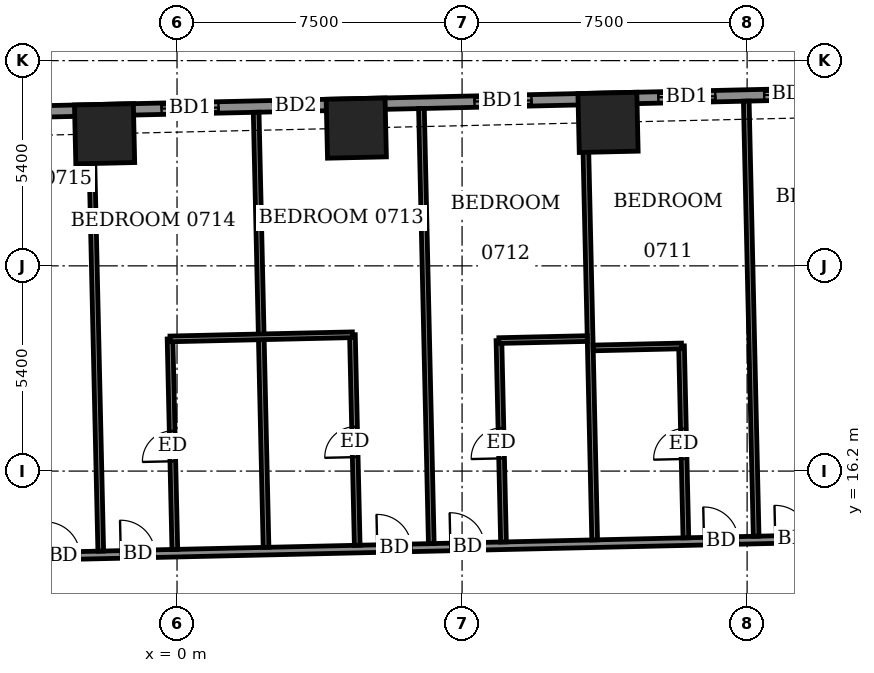
"""IFC4 building model, lengths in metres.
Left out: names, types, materials, properties, quantities, classifications, styles, units other than length and angle.
Written with IfcOpenShell. Run it as: python <this file> out.ifc"""

import sys

from ifc_helpers import new_model, si_unit, direction, frame, frame_2d, origin, origin_2d, place, context, subcontext, project, spatial, rectangle, extrude, element, fill, save


model = new_model("IFC4")
c1 = context("Model", 3, precision=1e-05, world=origin(), true_north=direction((0.0, 1.0)))
c2 = subcontext(c1, "Body", "Model", "MODEL_VIEW")
j1 = project(units=[si_unit("LENGTHUNIT", "METRE"), si_unit("PLANEANGLEUNIT", "RADIAN")], contexts=[c1])
p1 = place(None, origin())
s1 = spatial("IfcSite", under=j1, at=p1, CompositionType="ELEMENT")
p2 = place(p1, origin())
s2 = spatial("IfcBuilding", under=s1, at=p2, CompositionType="ELEMENT")
p3 = place(p2, frame((0.0, 0.0, 34.1)))
s3 = spatial("IfcBuildingStorey", under=s2, at=p3, CompositionType="ELEMENT", Elevation=34.1)
for number, where, z_axis, x_axis in (
    (1, (11.341, 25.375, -0.55), (0.0, 0.0, 1.0), (-1.0, -0.023, 0.0)),
    (2, (4.717, 25.225, -0.55), (0.0, 0.0, 1.0), (-1.0, -0.023, 0.0)),
    (3, (-1.906, 25.075, -0.55), (0.0, 0.0, 1.0), (-1.0, -0.023, 0.0)),
):
    element("IfcColumn", number, at=place(p3, frame(where, z_axis=z_axis, x_axis=x_axis)), inside=s3, PredefinedType="COLUMN", context=c2, shape_type="SweptSolid", body=[
        extrude(rectangle(XDim=1.55, YDim=1.55, at=origin_2d()), origin(), (0.0, 0.0, 1.0), 3.6),
    ])
p4 = place(p3, frame((24.423, 26.298, 0.0), z_axis=(0.0, 0.0, 1.0), x_axis=(-0.999742433108, -0.022695097355, 0.0)))
e4 = element("IfcWall", 4, at=p4, inside=s3, PredefinedType="SOLIDWALL", context=c2, shape_type="SweptSolid", body=[
    extrude(rectangle(XDim=52.701, YDim=0.3, at=frame_2d((26.35, 0.0))), origin(), (0.0, 0.0, 1.0), 3.05),
])
p5 = place(p4, frame((2.357, 0.0, 0.0)))
e5 = element("IfcOpeningElement", 5, at=p5, cuts=e4, PredefinedType="OPENING", context=c2, shape_type="SweptSolid", body=[
    extrude(rectangle(XDim=1.5, YDim=2.4, at=frame_2d((0.75, 1.2))), frame((0.0, 0.16, 0.0), z_axis=(0.0, -1.0, 0.0), x_axis=(1.0, 0.0, 0.0)), (0.0, 0.0, 1.0), 0.32),
])
p6 = place(p4, frame((7.475, 0.0, 0.0)))
e6 = element("IfcOpeningElement", 6, at=p6, cuts=e4, PredefinedType="OPENING", context=c2, shape_type="SweptSolid", body=[
    extrude(rectangle(XDim=1.5, YDim=2.4, at=frame_2d((0.75, 1.2))), frame((0.0, 0.16, 0.0), z_axis=(0.0, -1.0, 0.0), x_axis=(1.0, 0.0, 0.0)), (0.0, 0.0, 1.0), 0.32),
])
p7 = place(p4, frame((10.262, 0.0, 0.0)))
e7 = element("IfcOpeningElement", 7, at=p7, cuts=e4, PredefinedType="OPENING", context=c2, shape_type="SweptSolid", body=[
    extrude(rectangle(XDim=1.5, YDim=2.4, at=frame_2d((0.75, 1.2))), frame((0.0, 0.16, 0.0), z_axis=(0.0, -1.0, 0.0), x_axis=(1.0, 0.0, 0.0)), (0.0, 0.0, 1.0), 0.32),
])
p8 = place(p4, frame((15.1, 0.0, 0.0)))
e8 = element("IfcOpeningElement", 8, at=p8, cuts=e4, PredefinedType="OPENING", context=c2, shape_type="SweptSolid", body=[
    extrude(rectangle(XDim=1.5, YDim=2.4, at=frame_2d((0.75, 1.2))), frame((0.0, 0.16, 0.0), z_axis=(0.0, -1.0, 0.0), x_axis=(1.0, 0.0, 0.0)), (0.0, 0.0, 1.0), 0.32),
])
p9 = place(p4, frame((20.7, 0.0, 0.0)))
e9 = element("IfcOpeningElement", 9, at=p9, cuts=e4, PredefinedType="OPENING", context=c2, shape_type="SweptSolid", body=[
    extrude(rectangle(XDim=1.2, YDim=2.4, at=frame_2d((0.6, 1.2))), frame((0.0, 0.16, 0.0), z_axis=(0.0, -1.0, 0.0), x_axis=(1.0, 0.0, 0.0)), (0.0, 0.0, 1.0), 0.32),
])
p10 = place(p4, frame((23.337, 0.0, 0.0)))
e10 = element("IfcOpeningElement", 10, at=p10, cuts=e4, PredefinedType="OPENING", context=c2, shape_type="SweptSolid", body=[
    extrude(rectangle(XDim=1.5, YDim=2.4, at=frame_2d((0.75, 1.2))), frame((0.0, 0.16, 0.0), z_axis=(0.0, -1.0, 0.0), x_axis=(1.0, 0.0, 0.0)), (0.0, 0.0, 1.0), 0.32),
])
p11 = place(p4, frame((28.238, 0.0, 0.0)))
e11 = element("IfcOpeningElement", 11, at=p11, cuts=e4, PredefinedType="OPENING", context=c2, shape_type="SweptSolid", body=[
    extrude(rectangle(XDim=1.5, YDim=2.4, at=frame_2d((0.75, 1.2))), frame((0.0, 0.16, 0.0), z_axis=(0.0, -1.0, 0.0), x_axis=(1.0, 0.0, 0.0)), (0.0, 0.0, 1.0), 0.32),
])
p12 = place(p4, frame((33.9, 0.0, 0.0)))
e12 = element("IfcOpeningElement", 12, at=p12, cuts=e4, PredefinedType="OPENING", context=c2, shape_type="SweptSolid", body=[
    extrude(rectangle(XDim=1.2, YDim=2.4, at=frame_2d((0.6, 1.2))), frame((0.0, 0.16, 0.0), z_axis=(0.0, -1.0, 0.0), x_axis=(1.0, 0.0, 0.0)), (0.0, 0.0, 1.0), 0.32),
])
p13 = place(p4, frame((36.538, 0.0, 0.0)))
e13 = element("IfcOpeningElement", 13, at=p13, cuts=e4, PredefinedType="OPENING", context=c2, shape_type="SweptSolid", body=[
    extrude(rectangle(XDim=1.5, YDim=2.4, at=frame_2d((0.75, 1.2))), frame((0.0, 0.16, 0.0), z_axis=(0.0, -1.0, 0.0), x_axis=(1.0, 0.0, 0.0)), (0.0, 0.0, 1.0), 0.32),
])
p14 = place(p4, frame((41.338, 0.0, 0.0)))
e14 = element("IfcOpeningElement", 14, at=p14, cuts=e4, PredefinedType="OPENING", context=c2, shape_type="SweptSolid", body=[
    extrude(rectangle(XDim=1.5, YDim=2.4, at=frame_2d((0.75, 1.2))), frame((0.0, 0.16, 0.0), z_axis=(0.0, -1.0, 0.0), x_axis=(1.0, 0.0, 0.0)), (0.0, 0.0, 1.0), 0.32),
])
p15 = place(p4, frame((44.4, 0.0, 0.9)))
e15 = element("IfcOpeningElement", 15, at=p15, cuts=e4, PredefinedType="OPENING", context=c2, shape_type="SweptSolid", body=[
    extrude(rectangle(XDim=0.9, YDim=1.5, at=frame_2d((0.45, 0.75))), frame((0.0, 0.16, 0.0), z_axis=(0.0, -1.0, 0.0), x_axis=(1.0, 0.0, 0.0)), (0.0, 0.0, 1.0), 0.32),
])
p16 = place(p4, frame((48.764, 0.0, 0.9)))
e16 = element("IfcOpeningElement", 16, at=p16, cuts=e4, PredefinedType="OPENING", context=c2, shape_type="SweptSolid", body=[
    extrude(rectangle(XDim=2.4, YDim=1.5, at=frame_2d((1.2, 0.75))), frame((0.0, 0.16, 0.0), z_axis=(0.0, -1.0, 0.0), x_axis=(1.0, 0.0, 0.0)), (0.0, 0.0, 1.0), 0.32),
])
p17 = place(p3, frame((7.744, 27.369, 0.0), z_axis=(0.0, 0.0, 1.0), x_axis=(0.999743178102, 0.022662255828, 0.0)))
e17 = element("IfcWall", 17, at=p17, inside=s3, PredefinedType="USERDEFINED", context=c2, shape_type="SweptSolid", body=[
    extrude(rectangle(XDim=6.0, YDim=0.55, at=frame_2d((3.0, 0.0))), origin(), (0.0, 0.0, 1.0), 0.8),
])
p18 = place(p3, frame((-31.347, 13.329, 0.0), z_axis=(0.0, 0.0, 1.0), x_axis=(0.999742613079, 0.022687168058, 0.0)))
e18 = element("IfcWall", 18, at=p18, inside=s3, PredefinedType="PARTITIONING", context=c2, shape_type="SweptSolid", body=[
    extrude(rectangle(XDim=58.799, YDim=0.2, at=frame_2d((29.399, 0.0))), origin(), (0.0, 0.0, 1.0), 3.05),
])
p19 = place(p18, frame((56.45, 0.0, 0.0)))
e19 = element("IfcOpeningElement", 19, at=p19, cuts=e18, PredefinedType="OPENING", context=c2, shape_type="SweptSolid", body=[
    extrude(rectangle(XDim=1.0, YDim=2.1, at=frame_2d((0.5, 1.05))), frame((0.0, 0.11, 0.0), z_axis=(0.0, -1.0, 0.0), x_axis=(1.0, 0.0, 0.0)), (0.0, 0.0, 1.0), 0.22),
])
p20 = place(p18, frame((51.85, 0.0, 0.0)))
e20 = element("IfcOpeningElement", 20, at=p20, cuts=e18, PredefinedType="OPENING", context=c2, shape_type="SweptSolid", body=[
    extrude(rectangle(XDim=0.9, YDim=2.1, at=frame_2d((0.45, 1.05))), frame((0.0, 0.11, 0.0), z_axis=(0.0, -1.0, 0.0), x_axis=(1.0, 0.0, 0.0)), (0.0, 0.0, 1.0), 0.22),
])
p21 = place(p18, frame((47.1, 0.0, 0.0)))
e21 = element("IfcOpeningElement", 21, at=p21, cuts=e18, PredefinedType="OPENING", context=c2, shape_type="SweptSolid", body=[
    extrude(rectangle(XDim=0.9, YDim=2.1, at=frame_2d((0.45, 1.05))), frame((0.0, 0.11, 0.0), z_axis=(0.0, -1.0, 0.0), x_axis=(1.0, 0.0, 0.0)), (0.0, 0.0, 1.0), 0.22),
])
p22 = place(p18, frame((45.225, 0.0, 0.0)))
e22 = element("IfcOpeningElement", 22, at=p22, cuts=e18, PredefinedType="OPENING", context=c2, shape_type="SweptSolid", body=[
    extrude(rectangle(XDim=0.9, YDim=2.1, at=frame_2d((0.45, 1.05))), frame((0.0, 0.11, 0.0), z_axis=(0.0, -1.0, 0.0), x_axis=(1.0, 0.0, 0.0)), (0.0, 0.0, 1.0), 0.22),
])
p23 = place(p18, frame((38.55, 0.0, 0.0)))
e23 = element("IfcOpeningElement", 23, at=p23, cuts=e18, PredefinedType="OPENING", context=c2, shape_type="SweptSolid", body=[
    extrude(rectangle(XDim=0.9, YDim=2.1, at=frame_2d((0.45, 1.05))), frame((0.0, 0.11, 0.0), z_axis=(0.0, -1.0, 0.0), x_axis=(1.0, 0.0, 0.0)), (0.0, 0.0, 1.0), 0.22),
])
p24 = place(p18, frame((36.625, 0.0, 0.0)))
e24 = element("IfcOpeningElement", 24, at=p24, cuts=e18, PredefinedType="OPENING", context=c2, shape_type="SweptSolid", body=[
    extrude(rectangle(XDim=0.9, YDim=2.1, at=frame_2d((0.45, 1.05))), frame((0.0, 0.11, 0.0), z_axis=(0.0, -1.0, 0.0), x_axis=(1.0, 0.0, 0.0)), (0.0, 0.0, 1.0), 0.22),
])
p25 = place(p18, frame((29.875, 0.0, 0.0)))
e25 = element("IfcOpeningElement", 25, at=p25, cuts=e18, PredefinedType="OPENING", context=c2, shape_type="SweptSolid", body=[
    extrude(rectangle(XDim=0.9, YDim=2.1, at=frame_2d((0.45, 1.05))), frame((0.0, 0.11, 0.0), z_axis=(0.0, -1.0, 0.0), x_axis=(1.0, 0.0, 0.0)), (0.0, 0.0, 1.0), 0.22),
])
p26 = place(p18, frame((27.9, 0.0, 0.0)))
e26 = element("IfcOpeningElement", 26, at=p26, cuts=e18, PredefinedType="OPENING", context=c2, shape_type="SweptSolid", body=[
    extrude(rectangle(XDim=0.9, YDim=2.1, at=frame_2d((0.45, 1.05))), frame((0.0, 0.11, 0.0), z_axis=(0.0, -1.0, 0.0), x_axis=(1.0, 0.0, 0.0)), (0.0, 0.0, 1.0), 0.22),
])
p27 = place(p18, frame((21.1, 0.0, 0.0)))
e27 = element("IfcOpeningElement", 27, at=p27, cuts=e18, PredefinedType="OPENING", context=c2, shape_type="SweptSolid", body=[
    extrude(rectangle(XDim=0.9, YDim=2.1, at=frame_2d((0.45, 1.05))), frame((0.0, 0.11, 0.0), z_axis=(0.0, -1.0, 0.0), x_axis=(1.0, 0.0, 0.0)), (0.0, 0.0, 1.0), 0.22),
])
p28 = place(p18, frame((19.175, 0.0, 0.0)))
e28 = element("IfcOpeningElement", 28, at=p28, cuts=e18, PredefinedType="OPENING", context=c2, shape_type="SweptSolid", body=[
    extrude(rectangle(XDim=0.9, YDim=2.1, at=frame_2d((0.45, 1.05))), frame((0.0, 0.11, 0.0), z_axis=(0.0, -1.0, 0.0), x_axis=(1.0, 0.0, 0.0)), (0.0, 0.0, 1.0), 0.22),
])
p29 = place(p18, frame((12.5, 0.0, 0.0)))
e29 = element("IfcOpeningElement", 29, at=p29, cuts=e18, PredefinedType="OPENING", context=c2, shape_type="SweptSolid", body=[
    extrude(rectangle(XDim=0.9, YDim=2.1, at=frame_2d((0.45, 1.05))), frame((0.0, 0.11, 0.0), z_axis=(0.0, -1.0, 0.0), x_axis=(1.0, 0.0, 0.0)), (0.0, 0.0, 1.0), 0.22),
])
p30 = place(p18, frame((10.575, 0.0, 0.0)))
e30 = element("IfcOpeningElement", 30, at=p30, cuts=e18, PredefinedType="OPENING", context=c2, shape_type="SweptSolid", body=[
    extrude(rectangle(XDim=0.9, YDim=2.1, at=frame_2d((0.45, 1.05))), frame((0.0, 0.11, 0.0), z_axis=(0.0, -1.0, 0.0), x_axis=(1.0, 0.0, 0.0)), (0.0, 0.0, 1.0), 0.22),
])
p31 = place(p18, frame((1.425, 0.0, 0.0)))
e31 = element("IfcOpeningElement", 31, at=p31, cuts=e18, PredefinedType="OPENING", context=c2, shape_type="SweptSolid", body=[
    extrude(rectangle(XDim=1.0, YDim=2.1, at=frame_2d((0.5, 1.05))), frame((0.0, 0.11, 0.0), z_axis=(0.0, -1.0, 0.0), x_axis=(1.0, 0.0, 0.0)), (0.0, 0.0, 1.0), 0.22),
])
p32 = place(p18, frame((6.0, 0.0, 0.0)))
e32 = element("IfcOpeningElement", 32, at=p32, cuts=e18, PredefinedType="OPENING", context=c2, shape_type="SweptSolid", body=[
    extrude(rectangle(XDim=0.9, YDim=2.1, at=frame_2d((0.45, 1.05))), frame((0.0, 0.11, 0.0), z_axis=(0.0, -1.0, 0.0), x_axis=(1.0, 0.0, 0.0)), (0.0, 0.0, 1.0), 0.22),
])
p33 = place(p3, frame((-2.007, 14.095, 0.0), z_axis=(0.0, 0.0, 1.0), x_axis=(-0.022708327922, 0.999742132674, 0.0)))
e33 = element("IfcWall", 33, at=p33, inside=s3, PredefinedType="PARTITIONING", context=c2, shape_type="SweptSolid", body=[
    extrude(rectangle(XDim=11.45, YDim=0.15, at=frame_2d((5.725, 0.0))), origin(), (0.0, 0.0, 1.0), 3.05),
])
p34 = place(p3, frame((-0.058, 14.139, 0.0), z_axis=(0.0, 0.0, 1.0), x_axis=(-0.02273742063, 0.999741471433, 0.0)))
e34 = element("IfcWall", 34, at=p34, inside=s3, PredefinedType="PARTITIONING", context=c2, shape_type="SweptSolid", body=[
    extrude(rectangle(XDim=5.541, YDim=0.15, at=frame_2d((2.77, 0.0))), origin(), (0.0, 0.0, 1.0), 3.05),
])
p35 = place(p34, frame((2.32, 0.0, 0.0)))
e35 = element("IfcOpeningElement", 35, at=p35, cuts=e34, PredefinedType="OPENING", context=c2, shape_type="SweptSolid", body=[
    extrude(rectangle(XDim=0.8, YDim=2.1, at=frame_2d((0.4, 1.05))), frame((0.0, 0.085, 0.0), z_axis=(0.0, -1.0, 0.0), x_axis=(1.0, 0.0, 0.0)), (0.0, 0.0, 1.0), 0.17),
])
p36 = place(p3, frame((2.342, 14.194, 0.0), z_axis=(0.0, 0.0, 1.0), x_axis=(-0.022708327922, 0.999742132674, 0.0)))
e36 = element("IfcWall", 36, at=p36, inside=s3, PredefinedType="PARTITIONING", context=c2, shape_type="SweptSolid", body=[
    extrude(rectangle(XDim=11.45, YDim=0.15, at=frame_2d((5.725, 0.0))), origin(), (0.0, 0.0, 1.0), 2.55),
])
p37 = place(p3, frame((4.741, 14.248, 0.0), z_axis=(0.0, 0.0, 1.0), x_axis=(-0.02273742063, 0.999741471433, 0.0)))
e37 = element("IfcWall", 37, at=p37, inside=s3, PredefinedType="PARTITIONING", context=c2, shape_type="SweptSolid", body=[
    extrude(rectangle(XDim=5.541, YDim=0.15, at=frame_2d((2.77, 0.0))), origin(), (0.0, 0.0, 1.0), 3.05),
])
p38 = place(p37, frame((2.32, 0.0, 0.0)))
e38 = element("IfcOpeningElement", 38, at=p38, cuts=e37, PredefinedType="OPENING", context=c2, shape_type="SweptSolid", body=[
    extrude(rectangle(XDim=0.8, YDim=2.1, at=frame_2d((0.4, 1.05))), frame((0.0, 0.085, 0.0), z_axis=(0.0, -1.0, 0.0), x_axis=(1.0, 0.0, 0.0)), (0.0, 0.0, 1.0), 0.17),
])
p39 = place(p3, frame((6.69, 14.292, 0.0), z_axis=(0.0, 0.0, 1.0), x_axis=(-0.022621153305, 0.999744108971, 0.0)))
e39 = element("IfcWall", 39, at=p39, inside=s3, PredefinedType="PARTITIONING", context=c2, shape_type="SweptSolid", body=[
    extrude(rectangle(XDim=11.451, YDim=0.15, at=frame_2d((5.726, 0.0))), origin(), (0.0, 0.0, 1.0), 2.55),
])
p40 = place(p3, frame((8.59, 14.335, 0.0), z_axis=(0.0, 0.0, 1.0), x_axis=(-0.022661766832, 0.999743189186, 0.0)))
e40 = element("IfcWall", 40, at=p40, inside=s3, PredefinedType="PARTITIONING", context=c2, shape_type="SweptSolid", body=[
    extrude(rectangle(XDim=5.301, YDim=0.15, at=frame_2d((2.65, 0.0))), origin(), (0.0, 0.0, 1.0), 3.05),
])
p41 = place(p40, frame((2.2, 0.0, 0.0)))
e41 = element("IfcOpeningElement", 41, at=p41, cuts=e40, PredefinedType="OPENING", context=c2, shape_type="SweptSolid", body=[
    extrude(rectangle(XDim=0.8, YDim=2.1, at=frame_2d((0.4, 1.05))), frame((0.0, 0.085, 0.0), z_axis=(0.0, -1.0, 0.0), x_axis=(1.0, 0.0, 0.0)), (0.0, 0.0, 1.0), 0.17),
])
p42 = place(p3, frame((10.989, 14.39, 0.0), z_axis=(0.0, 0.0, 1.0), x_axis=(-0.022623082162, 0.999744065325, 0.0)))
e42 = element("IfcWall", 42, at=p42, inside=s3, PredefinedType="PARTITIONING", context=c2, shape_type="SweptSolid", body=[
    extrude(rectangle(XDim=11.45, YDim=0.15, at=frame_2d((5.725, 0.0))), origin(), (0.0, 0.0, 1.0), 3.05),
])
p43 = place(p3, frame((13.389, 14.444, 0.0), z_axis=(0.0, 0.0, 1.0), x_axis=(-0.022769723731, 0.999740736232, 0.0)))
e43 = element("IfcWall", 43, at=p43, inside=s3, PredefinedType="PARTITIONING", context=c2, shape_type="SweptSolid", body=[
    extrude(rectangle(XDim=5.05, YDim=0.15, at=frame_2d((2.525, 0.0))), origin(), (0.0, 0.0, 1.0), 3.05),
])
p44 = place(p43, frame((2.075, 0.0, 0.0)))
e44 = element("IfcOpeningElement", 44, at=p44, cuts=e43, PredefinedType="OPENING", context=c2, shape_type="SweptSolid", body=[
    extrude(rectangle(XDim=0.8, YDim=2.1, at=frame_2d((0.4, 1.05))), frame((0.0, 0.085, 0.0), z_axis=(0.0, -1.0, 0.0), x_axis=(1.0, 0.0, 0.0)), (0.0, 0.0, 1.0), 0.17),
])
p45 = place(p3, frame((15.238, 14.486, 0.0), z_axis=(0.0, 0.0, 1.0), x_axis=(-0.022706391805, 0.999742176649, 0.0)))
e45 = element("IfcWall", 45, at=p45, inside=s3, PredefinedType="PARTITIONING", context=c2, shape_type="SweptSolid", body=[
    extrude(rectangle(XDim=11.451, YDim=0.15, at=frame_2d((5.726, 0.0))), origin(), (0.0, 0.0, 1.0), 2.55),
])
for number, where, z_axis, x_axis in (
    (46, (10.95, 19.44, 0.0), (0.0, 0.0, 1.0), (1.0, 0.023, 0.0)),
    (47, (8.47, 19.634, 0.0), (0.0, 0.0, 1.0), (1.0, 0.023, 0.0)),
):
    element("IfcWall", number, at=place(p3, frame(where, z_axis=z_axis, x_axis=x_axis)), inside=s3, PredefinedType="PARTITIONING", context=c2, shape_type="SweptSolid", body=[
        extrude(rectangle(XDim=2.324, YDim=0.15, at=frame_2d((1.162, 0.0))), origin(), (0.0, 0.0, 1.0), 3.05),
    ])
p46 = place(p3, frame((-0.184, 19.678, 0.0), z_axis=(0.0, 0.0, 1.0), x_axis=(0.99974154664, 0.022734113616, 0.0)))
e48 = element("IfcWall", 48, at=p46, inside=s3, PredefinedType="PARTITIONING", context=c2, shape_type="SweptSolid", body=[
    extrude(rectangle(XDim=4.8, YDim=0.15, at=frame_2d((2.4, 0.0))), origin(), (0.0, 0.0, 1.0), 3.05),
])
p47 = place(p6, origin())
e49 = element("IfcDoor", 49, at=p47, inside=s3, OperationType="SLIDING_TO_LEFT", PredefinedType="DOOR", context=c2, shape_type="SweptSolid", body=[
    extrude(rectangle(XDim=1.5, YDim=2.4, at=frame_2d((0.75, 1.2))), frame((0.0, 0.025, 0.0), z_axis=(0.0, -1.0, 0.0), x_axis=(1.0, 0.0, 0.0)), (0.0, 0.0, 1.0), 0.05),
])
fill(e6, e49)
p48 = place(p7, origin())
e50 = element("IfcDoor", 50, at=p48, inside=s3, OperationType="SLIDING_TO_LEFT", PredefinedType="DOOR", context=c2, shape_type="SweptSolid", body=[
    extrude(rectangle(XDim=1.5, YDim=2.4, at=frame_2d((0.75, 1.2))), frame((0.0, 0.025, 0.0), z_axis=(0.0, -1.0, 0.0), x_axis=(1.0, 0.0, 0.0)), (0.0, 0.0, 1.0), 0.05),
])
fill(e7, e50)
p49 = place(p8, origin())
e51 = element("IfcDoor", 51, at=p49, inside=s3, OperationType="SLIDING_TO_LEFT", PredefinedType="DOOR", context=c2, shape_type="SweptSolid", body=[
    extrude(rectangle(XDim=1.5, YDim=2.4, at=frame_2d((0.75, 1.2))), frame((0.0, 0.025, 0.0), z_axis=(0.0, -1.0, 0.0), x_axis=(1.0, 0.0, 0.0)), (0.0, 0.0, 1.0), 0.05),
])
fill(e8, e51)
p50 = place(p9, origin())
e52 = element("IfcDoor", 52, at=p50, inside=s3, OperationType="SLIDING_TO_LEFT", PredefinedType="DOOR", context=c2, shape_type="SweptSolid", body=[
    extrude(rectangle(XDim=1.2, YDim=2.4, at=frame_2d((0.6, 1.2))), frame((0.0, 0.025, 0.0), z_axis=(0.0, -1.0, 0.0), x_axis=(1.0, 0.0, 0.0)), (0.0, 0.0, 1.0), 0.05),
])
fill(e9, e52)
p51 = place(p10, origin())
e53 = element("IfcDoor", 53, at=p51, inside=s3, OperationType="SLIDING_TO_LEFT", PredefinedType="DOOR", context=c2, shape_type="SweptSolid", body=[
    extrude(rectangle(XDim=1.5, YDim=2.4, at=frame_2d((0.75, 1.2))), frame((0.0, 0.025, 0.0), z_axis=(0.0, -1.0, 0.0), x_axis=(1.0, 0.0, 0.0)), (0.0, 0.0, 1.0), 0.05),
])
fill(e10, e53)
p52 = place(p21, origin())
e54 = element("IfcDoor", 54, at=p52, inside=s3, OperationType="SINGLE_SWING_RIGHT", PredefinedType="DOOR", context=c2, shape_type="SweptSolid", body=[
    extrude(rectangle(XDim=0.9, YDim=2.1, at=frame_2d((0.45, 1.05))), frame((0.0, 0.025, 0.0), z_axis=(0.0, -1.0, 0.0), x_axis=(1.0, 0.0, 0.0)), (0.0, 0.0, 1.0), 0.05),
])
fill(e21, e54)
p53 = place(p22, origin())
e55 = element("IfcDoor", 55, at=p53, inside=s3, OperationType="SINGLE_SWING_LEFT", PredefinedType="DOOR", context=c2, shape_type="SweptSolid", body=[
    extrude(rectangle(XDim=0.9, YDim=2.1, at=frame_2d((0.45, 1.05))), frame((0.0, 0.025, 0.0), z_axis=(0.0, -1.0, 0.0), x_axis=(1.0, 0.0, 0.0)), (0.0, 0.0, 1.0), 0.05),
])
fill(e22, e55)
p54 = place(p44, origin())
e56 = element("IfcDoor", 56, at=p54, inside=s3, OperationType="SINGLE_SWING_LEFT", PredefinedType="DOOR", context=c2, shape_type="SweptSolid", body=[
    extrude(rectangle(XDim=0.8, YDim=2.1, at=frame_2d((0.4, 1.05))), frame((0.0, 0.025, 0.0), z_axis=(0.0, -1.0, 0.0), x_axis=(1.0, 0.0, 0.0)), (0.0, 0.0, 1.0), 0.05),
])
fill(e44, e56)
p55 = place(p23, origin())
e57 = element("IfcDoor", 57, at=p55, inside=s3, OperationType="SINGLE_SWING_RIGHT", PredefinedType="DOOR", context=c2, shape_type="SweptSolid", body=[
    extrude(rectangle(XDim=0.9, YDim=2.1, at=frame_2d((0.45, 1.05))), frame((0.0, 0.025, 0.0), z_axis=(0.0, -1.0, 0.0), x_axis=(1.0, 0.0, 0.0)), (0.0, 0.0, 1.0), 0.05),
])
fill(e23, e57)
p56 = place(p41, origin())
e58 = element("IfcDoor", 58, at=p56, inside=s3, OperationType="SINGLE_SWING_RIGHT", PredefinedType="DOOR", context=c2, shape_type="SweptSolid", body=[
    extrude(rectangle(XDim=0.8, YDim=2.1, at=frame_2d((0.4, 1.05))), frame((0.0, 0.025, 0.0), z_axis=(0.0, -1.0, 0.0), x_axis=(1.0, 0.0, 0.0)), (0.0, 0.0, 1.0), 0.05),
])
fill(e41, e58)
p57 = place(p24, origin())
e59 = element("IfcDoor", 59, at=p57, inside=s3, OperationType="SINGLE_SWING_LEFT", PredefinedType="DOOR", context=c2, shape_type="SweptSolid", body=[
    extrude(rectangle(XDim=0.9, YDim=2.1, at=frame_2d((0.45, 1.05))), frame((0.0, 0.025, 0.0), z_axis=(0.0, -1.0, 0.0), x_axis=(1.0, 0.0, 0.0)), (0.0, 0.0, 1.0), 0.05),
])
fill(e24, e59)
p58 = place(p38, origin())
e60 = element("IfcDoor", 60, at=p58, inside=s3, OperationType="SINGLE_SWING_LEFT", PredefinedType="DOOR", context=c2, shape_type="SweptSolid", body=[
    extrude(rectangle(XDim=0.8, YDim=2.1, at=frame_2d((0.4, 1.05))), frame((0.0, 0.025, 0.0), z_axis=(0.0, -1.0, 0.0), x_axis=(1.0, 0.0, 0.0)), (0.0, 0.0, 1.0), 0.05),
])
fill(e38, e60)
p59 = place(p25, origin())
e61 = element("IfcDoor", 61, at=p59, inside=s3, OperationType="SINGLE_SWING_RIGHT", PredefinedType="DOOR", context=c2, shape_type="SweptSolid", body=[
    extrude(rectangle(XDim=0.9, YDim=2.1, at=frame_2d((0.45, 1.05))), frame((0.0, 0.025, 0.0), z_axis=(0.0, -1.0, 0.0), x_axis=(1.0, 0.0, 0.0)), (0.0, 0.0, 1.0), 0.05),
])
fill(e25, e61)
p60 = place(p35, origin())
e62 = element("IfcDoor", 62, at=p60, inside=s3, OperationType="SINGLE_SWING_RIGHT", PredefinedType="DOOR", context=c2, shape_type="SweptSolid", body=[
    extrude(rectangle(XDim=0.8, YDim=2.1, at=frame_2d((0.4, 1.05))), frame((0.0, 0.025, 0.0), z_axis=(0.0, -1.0, 0.0), x_axis=(1.0, 0.0, 0.0)), (0.0, 0.0, 1.0), 0.05),
])
fill(e35, e62)
p61 = place(p26, origin())
e63 = element("IfcDoor", 63, at=p61, inside=s3, OperationType="SINGLE_SWING_LEFT", PredefinedType="DOOR", context=c2, shape_type="SweptSolid", body=[
    extrude(rectangle(XDim=0.9, YDim=2.1, at=frame_2d((0.45, 1.05))), frame((0.0, 0.025, 0.0), z_axis=(0.0, -1.0, 0.0), x_axis=(1.0, 0.0, 0.0)), (0.0, 0.0, 1.0), 0.05),
])
fill(e26, e63)
save(model, sys.argv[1])
